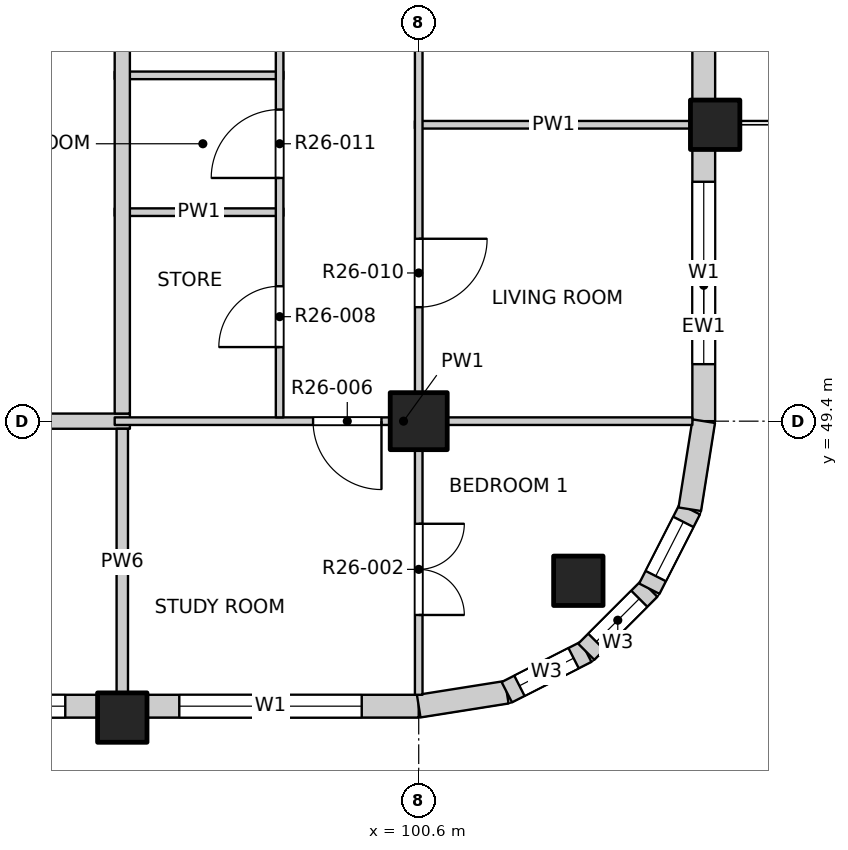
"""IFC4 building model, lengths in metres.
Left out: names, types, materials, properties, quantities, classifications, styles, units other than length and angle.
Written with IfcOpenShell. Run it as: python <this file> out.ifc"""

import sys

from ifc_helpers import new_model, si_unit, direction, frame, frame_2d, origin, origin_2d, place, context, subcontext, project, spatial, rectangle, extrude, element, fill, save


model = new_model("IFC4")
c1 = context("Model", 3, precision=1e-05, world=origin(), true_north=direction((0.0, 1.0)))
c2 = subcontext(c1, "Body", "Model", "MODEL_VIEW")
j1 = project(units=[si_unit("LENGTHUNIT", "METRE"), si_unit("PLANEANGLEUNIT", "RADIAN")], contexts=[c1])
p1 = place(None, origin())
s1 = spatial("IfcSite", under=j1, at=p1, CompositionType="ELEMENT")
p2 = place(p1, origin())
s2 = spatial("IfcBuilding", under=s1, at=p2, CompositionType="ELEMENT")
p3 = place(p2, frame((0.0, 0.0, 259.6)))
s3 = spatial("IfcBuildingStorey", under=s2, at=p3, CompositionType="ELEMENT", Elevation=259.6)
for number, where, z_axis, x_axis in (
    (1, (102.7, 47.3, -0.25), (0.0, 0.0, 1.0), (1.0, 0.0, 0.0)),
    (2, (104.5, 53.3, -0.25), (0.0, 0.0, 1.0), (1.0, 0.0, 0.0)),
    (3, (96.7, 45.5, -0.25), (0.0, 0.0, 1.0), (1.0, 0.0, 0.0)),
):
    element("IfcColumn", number, at=place(p3, frame(where, z_axis=z_axis, x_axis=x_axis)), inside=s3, PredefinedType="COLUMN", context=c2, shape_type="SweptSolid", body=[
        extrude(rectangle(XDim=0.65, YDim=0.65, at=origin_2d()), origin(), (0.0, 0.0, 1.0), 3.4),
    ])
p4 = place(p3, frame((100.6, 49.4, -0.25), z_axis=(0.0, 0.0, 1.0), x_axis=(1.0, 0.0, 0.0)))
e4 = element("IfcColumn", 4, at=p4, inside=s3, PredefinedType="COLUMN", context=c2, shape_type="SweptSolid", body=[
    extrude(rectangle(XDim=0.75, YDim=0.75, at=origin_2d()), origin(), (0.0, 0.0, 1.0), 3.4),
])
p5 = place(p3, frame((89.225, 45.65, 0.0), z_axis=(0.0, 0.0, 1.0), x_axis=(1.0, 0.0, 0.0)))
e5 = element("IfcWall", 5, at=p5, inside=s3, PredefinedType="SOLIDWALL", context=c2, shape_type="SweptSolid", body=[
    extrude(rectangle(XDim=7.15, YDim=0.3, at=frame_2d((3.575, 0.0))), origin(), (0.0, 0.0, 1.0), 3.15),
])
p6 = place(p5, frame((0.425, 0.0, 0.9)))
e6 = element("IfcOpeningElement", 6, at=p6, cuts=e5, PredefinedType="OPENING", context=c2, shape_type="SweptSolid", body=[
    extrude(rectangle(XDim=2.4, YDim=1.8, at=frame_2d((1.2, 0.9))), frame((0.0, 0.16, 0.0), z_axis=(0.0, -1.0, 0.0), x_axis=(1.0, 0.0, 0.0)), (0.0, 0.0, 1.0), 0.32),
])
p7 = place(p5, frame((4.325, 0.0, 0.9)))
e7 = element("IfcOpeningElement", 7, at=p7, cuts=e5, PredefinedType="OPENING", context=c2, shape_type="SweptSolid", body=[
    extrude(rectangle(XDim=2.4, YDim=1.8, at=frame_2d((1.2, 0.9))), frame((0.0, 0.16, 0.0), z_axis=(0.0, -1.0, 0.0), x_axis=(1.0, 0.0, 0.0)), (0.0, 0.0, 1.0), 0.32),
])
p8 = place(p3, frame((97.025, 45.65, 0.0), z_axis=(0.0, 0.0, 1.0), x_axis=(1.0, 0.0, 0.0)))
e8 = element("IfcWall", 8, at=p8, inside=s3, PredefinedType="SOLIDWALL", context=c2, shape_type="SweptSolid", body=[
    extrude(rectangle(XDim=3.575, YDim=0.3, at=frame_2d((1.788, 0.0))), origin(), (0.0, 0.0, 1.0), 3.15),
])
p9 = place(p8, frame((0.425, 0.0, 0.9)))
e9 = element("IfcOpeningElement", 9, at=p9, cuts=e8, PredefinedType="OPENING", context=c2, shape_type="SweptSolid", body=[
    extrude(rectangle(XDim=2.4, YDim=1.8, at=frame_2d((1.2, 0.9))), frame((0.0, 0.16, 0.0), z_axis=(0.0, -1.0, 0.0), x_axis=(1.0, 0.0, 0.0)), (0.0, 0.0, 1.0), 0.32),
])
p10 = place(p3, frame((104.35, 49.4, 0.0), z_axis=(0.0, 0.0, 1.0), x_axis=(0.0, 1.0, 0.0)))
e10 = element("IfcWall", 10, at=p10, inside=s3, PredefinedType="SOLIDWALL", context=c2, shape_type="SweptSolid", body=[
    extrude(rectangle(XDim=3.575, YDim=0.3, at=frame_2d((1.788, 0.0))), origin(), (0.0, 0.0, 1.0), 3.15),
])
p11 = place(p10, frame((0.75, 0.0, 0.9)))
e11 = element("IfcOpeningElement", 11, at=p11, cuts=e10, PredefinedType="OPENING", context=c2, shape_type="SweptSolid", body=[
    extrude(rectangle(XDim=2.4, YDim=1.8, at=frame_2d((1.2, 0.9))), frame((0.0, 0.16, 0.0), z_axis=(0.0, -1.0, 0.0), x_axis=(1.0, 0.0, 0.0)), (0.0, 0.0, 1.0), 0.32),
])
p12 = place(p3, frame((104.35, 53.625, 0.0), z_axis=(0.0, 0.0, 1.0), x_axis=(0.0, 1.0, 0.0)))
e12 = element("IfcWall", 12, at=p12, inside=s3, PredefinedType="SOLIDWALL", context=c2, shape_type="SweptSolid", body=[
    extrude(rectangle(XDim=7.15, YDim=0.3, at=frame_2d((3.575, 0.0))), origin(), (0.0, 0.0, 1.0), 3.15),
])
p13 = place(p12, frame((0.725, 0.0, 0.0)))
e13 = element("IfcOpeningElement", 13, at=p13, cuts=e12, PredefinedType="OPENING", context=c2, shape_type="SweptSolid", body=[
    extrude(rectangle(XDim=1.8, YDim=2.4, at=frame_2d((0.9, 1.2))), frame((0.0, 0.16, 0.0), z_axis=(0.0, -1.0, 0.0), x_axis=(1.0, 0.0, 0.0)), (0.0, 0.0, 1.0), 0.32),
])
p14 = place(p12, frame((4.325, 0.0, 0.9)))
e14 = element("IfcOpeningElement", 14, at=p14, cuts=e12, PredefinedType="OPENING", context=c2, shape_type="SweptSolid", body=[
    extrude(rectangle(XDim=2.4, YDim=1.8, at=frame_2d((1.2, 0.9))), frame((0.0, 0.16, 0.0), z_axis=(0.0, -1.0, 0.0), x_axis=(1.0, 0.0, 0.0)), (0.0, 0.0, 1.0), 0.32),
])
p15 = place(p3, frame((100.6, 45.65, 0.0), z_axis=(0.0, 0.0, 1.0), x_axis=(0.987678452879, 0.156496880861, 0.0)))
e15 = element("IfcWall", 15, at=p15, inside=s3, PredefinedType="SOLIDWALL", context=c2, shape_type="SweptSolid", body=[
    extrude(rectangle(XDim=1.173, YDim=0.3, at=frame_2d((0.586, 0.0))), origin(), (0.0, 0.0, 1.0), 3.15),
])
p16 = place(p3, frame((101.759, 45.833, 0.0), z_axis=(0.0, 0.0, 1.0), x_axis=(0.890988677504, 0.454025524128, 0.0)))
e16 = element("IfcWall", 16, at=p16, inside=s3, PredefinedType="SOLIDWALL", context=c2, shape_type="SweptSolid", body=[
    extrude(rectangle(XDim=1.173, YDim=0.3, at=frame_2d((0.587, 0.0))), origin(), (0.0, 0.0, 1.0), 3.15),
])
p17 = place(p16, frame((0.187, 0.0, 0.9)))
e17 = element("IfcOpeningElement", 17, at=p17, cuts=e16, PredefinedType="OPENING", context=c2, shape_type="SweptSolid", body=[
    extrude(rectangle(XDim=0.8, YDim=1.2, at=frame_2d((0.4, 0.6))), frame((0.0, 0.16, 0.0), z_axis=(0.0, -1.0, 0.0), x_axis=(1.0, 0.0, 0.0)), (0.0, 0.0, 1.0), 0.32),
])
p18 = place(p3, frame((102.804, 46.366, 0.0), z_axis=(0.0, 0.0, 1.0), x_axis=(0.707106781187, 0.707106781187, 0.0)))
e18 = element("IfcWall", 18, at=p18, inside=s3, PredefinedType="SOLIDWALL", context=c2, shape_type="SweptSolid", body=[
    extrude(rectangle(XDim=1.173, YDim=0.3, at=frame_2d((0.586, 0.0))), origin(), (0.0, 0.0, 1.0), 3.15),
])
p19 = place(p18, frame((0.187, 0.0, 0.9)))
e19 = element("IfcOpeningElement", 19, at=p19, cuts=e18, PredefinedType="OPENING", context=c2, shape_type="SweptSolid", body=[
    extrude(rectangle(XDim=0.8, YDim=1.2, at=frame_2d((0.4, 0.6))), frame((0.0, 0.16, 0.0), z_axis=(0.0, -1.0, 0.0), x_axis=(1.0, 0.0, 0.0)), (0.0, 0.0, 1.0), 0.32),
])
p20 = place(p3, frame((103.634, 47.196, 0.0), z_axis=(0.0, 0.0, 1.0), x_axis=(0.454025524128, 0.890988677504, 0.0)))
e20 = element("IfcWall", 20, at=p20, inside=s3, PredefinedType="SOLIDWALL", context=c2, shape_type="SweptSolid", body=[
    extrude(rectangle(XDim=1.173, YDim=0.3, at=frame_2d((0.587, 0.0))), origin(), (0.0, 0.0, 1.0), 3.15),
])
p21 = place(p20, frame((0.187, 0.0, 0.9)))
e21 = element("IfcOpeningElement", 21, at=p21, cuts=e20, PredefinedType="OPENING", context=c2, shape_type="SweptSolid", body=[
    extrude(rectangle(XDim=0.8, YDim=1.2, at=frame_2d((0.4, 0.6))), frame((0.0, 0.16, 0.0), z_axis=(0.0, -1.0, 0.0), x_axis=(1.0, 0.0, 0.0)), (0.0, 0.0, 1.0), 0.32),
])
p22 = place(p3, frame((104.167, 48.241, 0.0), z_axis=(0.0, 0.0, 1.0), x_axis=(0.156496880861, 0.987678452879, 0.0)))
e22 = element("IfcWall", 22, at=p22, inside=s3, PredefinedType="SOLIDWALL", context=c2, shape_type="SweptSolid", body=[
    extrude(rectangle(XDim=1.173, YDim=0.3, at=frame_2d((0.586, 0.0))), origin(), (0.0, 0.0, 1.0), 3.15),
])
p23 = place(p3, frame((73.2, 49.4, 0.0), z_axis=(0.0, 0.0, 1.0), x_axis=(1.0, 0.0, 0.0)))
e23 = element("IfcWall", 23, at=p23, inside=s3, PredefinedType="PARTITIONING", context=c2, shape_type="SweptSolid", body=[
    extrude(rectangle(XDim=23.6, YDim=0.2, at=frame_2d((11.8, 0.0))), origin(), (0.0, 0.0, 1.0), 3.15),
])
p24 = place(p23, frame((2.325, 0.0, 0.0)))
e24 = element("IfcOpeningElement", 24, at=p24, cuts=e23, PredefinedType="OPENING", context=c2, shape_type="SweptSolid", body=[
    extrude(rectangle(XDim=1.2, YDim=2.1, at=frame_2d((0.6, 1.05))), frame((0.0, 0.11, 0.0), z_axis=(0.0, -1.0, 0.0), x_axis=(1.0, 0.0, 0.0)), (0.0, 0.0, 1.0), 0.22),
])
p25 = place(p23, frame((15.1, 0.0, 0.0)))
e25 = element("IfcOpeningElement", 25, at=p25, cuts=e23, PredefinedType="OPENING", context=c2, shape_type="SweptSolid", body=[
    extrude(rectangle(XDim=1.2, YDim=2.1, at=frame_2d((0.6, 1.05))), frame((0.0, 0.11, 0.0), z_axis=(0.0, -1.0, 0.0), x_axis=(1.0, 0.0, 0.0)), (0.0, 0.0, 1.0), 0.22),
])
p26 = place(p3, frame((96.6, 49.4, 0.0), z_axis=(0.0, 0.0, 1.0), x_axis=(1.0, 0.0, 0.0)))
e26 = element("IfcWall", 26, at=p26, inside=s3, PredefinedType="PARTITIONING", context=c2, shape_type="SweptSolid", body=[
    extrude(rectangle(XDim=7.6, YDim=0.1, at=frame_2d((3.8, 0.0))), origin(), (0.0, 0.0, 1.0), 3.15),
])
p27 = place(p26, frame((2.61, 0.0, 0.0)))
e27 = element("IfcOpeningElement", 27, at=p27, cuts=e26, PredefinedType="OPENING", context=c2, shape_type="SweptSolid", body=[
    extrude(rectangle(XDim=0.9, YDim=2.1, at=frame_2d((0.45, 1.05))), frame((0.0, 0.06, 0.0), z_axis=(0.0, -1.0, 0.0), x_axis=(1.0, 0.0, 0.0)), (0.0, 0.0, 1.0), 0.12),
])
p28 = place(p3, frame((96.6, 52.15, 0.0), z_axis=(0.0, 0.0, 1.0), x_axis=(1.0, 0.0, 0.0)))
e28 = element("IfcWall", 28, at=p28, inside=s3, PredefinedType="PARTITIONING", context=c2, shape_type="SweptSolid", body=[
    extrude(rectangle(XDim=2.22, YDim=0.1, at=frame_2d((1.11, 0.0))), origin(), (0.0, 0.0, 1.0), 3.15),
])
p29 = place(p3, frame((100.55, 53.3, 0.0), z_axis=(0.0, 0.0, 1.0), x_axis=(1.0, 0.0, 0.0)))
e29 = element("IfcWall", 29, at=p29, inside=s3, PredefinedType="PARTITIONING", context=c2, shape_type="SweptSolid", body=[
    extrude(rectangle(XDim=3.65, YDim=0.1, at=frame_2d((1.825, 0.0))), origin(), (0.0, 0.0, 1.0), 3.15),
])
p30 = place(p3, frame((96.6, 53.95, 0.0), z_axis=(0.0, 0.0, 1.0), x_axis=(1.0, 0.0, 0.0)))
e30 = element("IfcWall", 30, at=p30, inside=s3, PredefinedType="PARTITIONING", context=c2, shape_type="SweptSolid", body=[
    extrude(rectangle(XDim=2.22, YDim=0.1, at=frame_2d((1.11, 0.0))), origin(), (0.0, 0.0, 1.0), 3.15),
])
p31 = place(p3, frame((96.7, 45.8, 0.0), z_axis=(0.0, 0.0, 1.0), x_axis=(0.0, 1.0, 0.0)))
e31 = element("IfcWall", 31, at=p31, inside=s3, PredefinedType="PARTITIONING", context=c2, shape_type="SweptSolid", body=[
    extrude(rectangle(XDim=3.5, YDim=0.15, at=frame_2d((1.75, 0.0))), origin(), (0.0, 0.0, 1.0), 3.15),
])
p32 = place(p3, frame((96.7, 49.5, 0.0), z_axis=(0.0, 0.0, 1.0), x_axis=(0.0, 1.0, 0.0)))
e32 = element("IfcWall", 32, at=p32, inside=s3, PredefinedType="PARTITIONING", context=c2, shape_type="SweptSolid", body=[
    extrude(rectangle(XDim=34.7, YDim=0.2, at=frame_2d((17.35, 0.0))), origin(), (0.0, 0.0, 1.0), 3.15),
])
p33 = place(p32, frame((10.425, 0.0, 0.0)))
e33 = element("IfcOpeningElement", 33, at=p33, cuts=e32, PredefinedType="OPENING", context=c2, shape_type="SweptSolid", body=[
    extrude(rectangle(XDim=1.0, YDim=2.1, at=frame_2d((0.5, 1.05))), frame((0.0, 0.11, 0.0), z_axis=(0.0, -1.0, 0.0), x_axis=(1.0, 0.0, 0.0)), (0.0, 0.0, 1.0), 0.22),
])
p34 = place(p32, frame((29.225, 0.0, 0.0)))
e34 = element("IfcOpeningElement", 34, at=p34, cuts=e32, PredefinedType="OPENING", context=c2, shape_type="SweptSolid", body=[
    extrude(rectangle(XDim=1.0, YDim=2.1, at=frame_2d((0.5, 1.05))), frame((0.0, 0.11, 0.0), z_axis=(0.0, -1.0, 0.0), x_axis=(1.0, 0.0, 0.0)), (0.0, 0.0, 1.0), 0.22),
])
p35 = place(p3, frame((98.77, 49.45, 0.0), z_axis=(0.0, 0.0, 1.0), x_axis=(0.0, 1.0, 0.0)))
e35 = element("IfcWall", 35, at=p35, inside=s3, PredefinedType="PARTITIONING", context=c2, shape_type="SweptSolid", body=[
    extrude(rectangle(XDim=9.15, YDim=0.1, at=frame_2d((4.575, 0.0))), origin(), (0.0, 0.0, 1.0), 3.15),
])
p36 = place(p35, frame((0.925, 0.0, 0.0)))
e36 = element("IfcOpeningElement", 36, at=p36, cuts=e35, PredefinedType="OPENING", context=c2, shape_type="SweptSolid", body=[
    extrude(rectangle(XDim=0.8, YDim=2.1, at=frame_2d((0.4, 1.05))), frame((0.0, 0.06, 0.0), z_axis=(0.0, -1.0, 0.0), x_axis=(1.0, 0.0, 0.0)), (0.0, 0.0, 1.0), 0.12),
])
p37 = place(p35, frame((3.15, 0.0, 0.0)))
e37 = element("IfcOpeningElement", 37, at=p37, cuts=e35, PredefinedType="OPENING", context=c2, shape_type="SweptSolid", body=[
    extrude(rectangle(XDim=0.9, YDim=2.1, at=frame_2d((0.45, 1.05))), frame((0.0, 0.06, 0.0), z_axis=(0.0, -1.0, 0.0), x_axis=(1.0, 0.0, 0.0)), (0.0, 0.0, 1.0), 0.12),
])
p38 = place(p35, frame((5.25, 0.0, 0.0)))
e38 = element("IfcOpeningElement", 38, at=p38, cuts=e35, PredefinedType="OPENING", context=c2, shape_type="SweptSolid", body=[
    extrude(rectangle(XDim=0.9, YDim=2.1, at=frame_2d((0.45, 1.05))), frame((0.0, 0.06, 0.0), z_axis=(0.0, -1.0, 0.0), x_axis=(1.0, 0.0, 0.0)), (0.0, 0.0, 1.0), 0.12),
])
p39 = place(p35, frame((7.65, 0.0, 0.0)))
e39 = element("IfcOpeningElement", 39, at=p39, cuts=e35, PredefinedType="OPENING", context=c2, shape_type="SweptSolid", body=[
    extrude(rectangle(XDim=0.8, YDim=2.1, at=frame_2d((0.4, 1.05))), frame((0.0, 0.06, 0.0), z_axis=(0.0, -1.0, 0.0), x_axis=(1.0, 0.0, 0.0)), (0.0, 0.0, 1.0), 0.12),
])
p40 = place(p3, frame((100.6, 45.8, 0.0), z_axis=(0.0, 0.0, 1.0), x_axis=(0.0, 1.0, 0.0)))
e40 = element("IfcWall", 40, at=p40, inside=s3, PredefinedType="PARTITIONING", context=c2, shape_type="SweptSolid", body=[
    extrude(rectangle(XDim=38.4, YDim=0.1, at=frame_2d((19.2, 0.0))), origin(), (0.0, 0.0, 1.0), 3.15),
])
p41 = place(p40, frame((1.05, 0.0, 0.0)))
e41 = element("IfcOpeningElement", 41, at=p41, cuts=e40, PredefinedType="OPENING", context=c2, shape_type="SweptSolid", body=[
    extrude(rectangle(XDim=1.2, YDim=2.1, at=frame_2d((0.6, 1.05))), frame((0.0, 0.06, 0.0), z_axis=(0.0, -1.0, 0.0), x_axis=(1.0, 0.0, 0.0)), (0.0, 0.0, 1.0), 0.12),
])
p42 = place(p40, frame((5.1, 0.0, 0.0)))
e42 = element("IfcOpeningElement", 42, at=p42, cuts=e40, PredefinedType="OPENING", context=c2, shape_type="SweptSolid", body=[
    extrude(rectangle(XDim=0.9, YDim=2.1, at=frame_2d((0.45, 1.05))), frame((0.0, 0.06, 0.0), z_axis=(0.0, -1.0, 0.0), x_axis=(1.0, 0.0, 0.0)), (0.0, 0.0, 1.0), 0.12),
])
p43 = place(p40, frame((9.0, 0.0, 0.0)))
e43 = element("IfcOpeningElement", 43, at=p43, cuts=e40, PredefinedType="OPENING", context=c2, shape_type="SweptSolid", body=[
    extrude(rectangle(XDim=0.9, YDim=2.1, at=frame_2d((0.45, 1.05))), frame((0.0, 0.06, 0.0), z_axis=(0.0, -1.0, 0.0), x_axis=(1.0, 0.0, 0.0)), (0.0, 0.0, 1.0), 0.12),
])
p44 = place(p40, frame((12.9, 0.0, 0.0)))
e44 = element("IfcOpeningElement", 44, at=p44, cuts=e40, PredefinedType="OPENING", context=c2, shape_type="SweptSolid", body=[
    extrude(rectangle(XDim=0.9, YDim=2.1, at=frame_2d((0.45, 1.05))), frame((0.0, 0.06, 0.0), z_axis=(0.0, -1.0, 0.0), x_axis=(1.0, 0.0, 0.0)), (0.0, 0.0, 1.0), 0.12),
])
p45 = place(p40, frame((16.8, 0.0, 0.0)))
e45 = element("IfcOpeningElement", 45, at=p45, cuts=e40, PredefinedType="OPENING", context=c2, shape_type="SweptSolid", body=[
    extrude(rectangle(XDim=0.9, YDim=2.1, at=frame_2d((0.45, 1.05))), frame((0.0, 0.06, 0.0), z_axis=(0.0, -1.0, 0.0), x_axis=(1.0, 0.0, 0.0)), (0.0, 0.0, 1.0), 0.12),
])
p46 = place(p40, frame((20.7, 0.0, 0.0)))
e46 = element("IfcOpeningElement", 46, at=p46, cuts=e40, PredefinedType="OPENING", context=c2, shape_type="SweptSolid", body=[
    extrude(rectangle(XDim=0.9, YDim=2.1, at=frame_2d((0.45, 1.05))), frame((0.0, 0.06, 0.0), z_axis=(0.0, -1.0, 0.0), x_axis=(1.0, 0.0, 0.0)), (0.0, 0.0, 1.0), 0.12),
])
p47 = place(p40, frame((24.6, 0.0, 0.0)))
e47 = element("IfcOpeningElement", 47, at=p47, cuts=e40, PredefinedType="OPENING", context=c2, shape_type="SweptSolid", body=[
    extrude(rectangle(XDim=0.9, YDim=2.1, at=frame_2d((0.45, 1.05))), frame((0.0, 0.06, 0.0), z_axis=(0.0, -1.0, 0.0), x_axis=(1.0, 0.0, 0.0)), (0.0, 0.0, 1.0), 0.12),
])
p48 = place(p40, frame((28.5, 0.0, 0.0)))
e48 = element("IfcOpeningElement", 48, at=p48, cuts=e40, PredefinedType="OPENING", context=c2, shape_type="SweptSolid", body=[
    extrude(rectangle(XDim=0.9, YDim=2.1, at=frame_2d((0.45, 1.05))), frame((0.0, 0.06, 0.0), z_axis=(0.0, -1.0, 0.0), x_axis=(1.0, 0.0, 0.0)), (0.0, 0.0, 1.0), 0.12),
])
p49 = place(p40, frame((32.4, 0.0, 0.0)))
e49 = element("IfcOpeningElement", 49, at=p49, cuts=e40, PredefinedType="OPENING", context=c2, shape_type="SweptSolid", body=[
    extrude(rectangle(XDim=0.9, YDim=2.1, at=frame_2d((0.45, 1.05))), frame((0.0, 0.06, 0.0), z_axis=(0.0, -1.0, 0.0), x_axis=(1.0, 0.0, 0.0)), (0.0, 0.0, 1.0), 0.12),
])
p50 = place(p40, frame((36.15, 0.0, 0.0)))
e50 = element("IfcOpeningElement", 50, at=p50, cuts=e40, PredefinedType="OPENING", context=c2, shape_type="SweptSolid", body=[
    extrude(rectangle(XDim=1.2, YDim=2.1, at=frame_2d((0.6, 1.05))), frame((0.0, 0.06, 0.0), z_axis=(0.0, -1.0, 0.0), x_axis=(1.0, 0.0, 0.0)), (0.0, 0.0, 1.0), 0.12),
])
p51 = place(p7, origin())
e51 = element("IfcWindow", 51, at=p51, inside=s3, PartitioningType="DOUBLE_PANEL_VERTICAL", PredefinedType="WINDOW", context=c2, shape_type="SweptSolid", body=[
    extrude(rectangle(XDim=2.4, YDim=1.8, at=frame_2d((1.2, 0.9))), frame((0.0, 0.03, 0.0), z_axis=(0.0, -1.0, 0.0), x_axis=(1.0, 0.0, 0.0)), (0.0, 0.0, 1.0), 0.06),
])
fill(e7, e51)
p52 = place(p9, origin())
e52 = element("IfcWindow", 52, at=p52, inside=s3, PartitioningType="DOUBLE_PANEL_VERTICAL", PredefinedType="WINDOW", context=c2, shape_type="SweptSolid", body=[
    extrude(rectangle(XDim=2.4, YDim=1.8, at=frame_2d((1.2, 0.9))), frame((0.0, 0.03, 0.0), z_axis=(0.0, -1.0, 0.0), x_axis=(1.0, 0.0, 0.0)), (0.0, 0.0, 1.0), 0.06),
])
fill(e9, e52)
p53 = place(p11, origin())
e53 = element("IfcWindow", 53, at=p53, inside=s3, PartitioningType="DOUBLE_PANEL_VERTICAL", PredefinedType="WINDOW", context=c2, shape_type="SweptSolid", body=[
    extrude(rectangle(XDim=2.4, YDim=1.8, at=frame_2d((1.2, 0.9))), frame((0.0, 0.03, 0.0), z_axis=(0.0, -1.0, 0.0), x_axis=(1.0, 0.0, 0.0)), (0.0, 0.0, 1.0), 0.06),
])
fill(e11, e53)
p54 = place(p17, origin())
e54 = element("IfcWindow", 54, at=p54, inside=s3, PartitioningType="SINGLE_PANEL", PredefinedType="WINDOW", context=c2, shape_type="SweptSolid", body=[
    extrude(rectangle(XDim=0.8, YDim=1.2, at=frame_2d((0.4, 0.6))), frame((0.0, 0.03, 0.0), z_axis=(0.0, -1.0, 0.0), x_axis=(1.0, 0.0, 0.0)), (0.0, 0.0, 1.0), 0.06),
])
fill(e17, e54)
p55 = place(p19, origin())
e55 = element("IfcWindow", 55, at=p55, inside=s3, PartitioningType="SINGLE_PANEL", PredefinedType="WINDOW", context=c2, shape_type="SweptSolid", body=[
    extrude(rectangle(XDim=0.8, YDim=1.2, at=frame_2d((0.4, 0.6))), frame((0.0, 0.03, 0.0), z_axis=(0.0, -1.0, 0.0), x_axis=(1.0, 0.0, 0.0)), (0.0, 0.0, 1.0), 0.06),
])
fill(e19, e55)
p56 = place(p21, origin())
e56 = element("IfcWindow", 56, at=p56, inside=s3, PartitioningType="SINGLE_PANEL", PredefinedType="WINDOW", context=c2, shape_type="SweptSolid", body=[
    extrude(rectangle(XDim=0.8, YDim=1.2, at=frame_2d((0.4, 0.6))), frame((0.0, 0.03, 0.0), z_axis=(0.0, -1.0, 0.0), x_axis=(1.0, 0.0, 0.0)), (0.0, 0.0, 1.0), 0.06),
])
fill(e21, e56)
p57 = place(p41, origin())
e57 = element("IfcDoor", 57, at=p57, inside=s3, OperationType="DOUBLE_DOOR_SINGLE_SWING", PredefinedType="DOOR", context=c2, shape_type="SweptSolid", body=[
    extrude(rectangle(XDim=1.2, YDim=2.1, at=frame_2d((0.6, 1.05))), frame((0.0, 0.025, 0.0), z_axis=(0.0, -1.0, 0.0), x_axis=(1.0, 0.0, 0.0)), (0.0, 0.0, 1.0), 0.05),
])
fill(e41, e57)
p58 = place(p27, origin())
e58 = element("IfcDoor", 58, at=p58, inside=s3, OperationType="SINGLE_SWING_LEFT", PredefinedType="DOOR", context=c2, shape_type="SweptSolid", body=[
    extrude(rectangle(XDim=0.9, YDim=2.1, at=frame_2d((0.45, 1.05))), frame((0.0, 0.025, 0.0), z_axis=(0.0, -1.0, 0.0), x_axis=(1.0, 0.0, 0.0)), (0.0, 0.0, 1.0), 0.05),
])
fill(e27, e58)
p59 = place(p36, origin())
e59 = element("IfcDoor", 59, at=p59, inside=s3, OperationType="SINGLE_SWING_LEFT", PredefinedType="DOOR", context=c2, shape_type="SweptSolid", body=[
    extrude(rectangle(XDim=0.8, YDim=2.1, at=frame_2d((0.4, 1.05))), frame((0.0, 0.025, 0.0), z_axis=(0.0, -1.0, 0.0), x_axis=(1.0, 0.0, 0.0)), (0.0, 0.0, 1.0), 0.05),
])
fill(e36, e59)
p60 = place(p42, origin())
e60 = element("IfcDoor", 60, at=p60, inside=s3, OperationType="SINGLE_SWING_LEFT", PredefinedType="DOOR", context=c2, shape_type="SweptSolid", body=[
    extrude(rectangle(XDim=0.9, YDim=2.1, at=frame_2d((0.45, 1.05))), frame((0.0, 0.025, 0.0), z_axis=(0.0, -1.0, 0.0), x_axis=(1.0, 0.0, 0.0)), (0.0, 0.0, 1.0), 0.05),
])
fill(e42, e60)
p61 = place(p37, origin())
e61 = element("IfcDoor", 61, at=p61, inside=s3, OperationType="SINGLE_SWING_LEFT", PredefinedType="DOOR", context=c2, shape_type="SweptSolid", body=[
    extrude(rectangle(XDim=0.9, YDim=2.1, at=frame_2d((0.45, 1.05))), frame((0.0, 0.025, 0.0), z_axis=(0.0, -1.0, 0.0), x_axis=(1.0, 0.0, 0.0)), (0.0, 0.0, 1.0), 0.05),
])
fill(e37, e61)
save(model, sys.argv[1])
